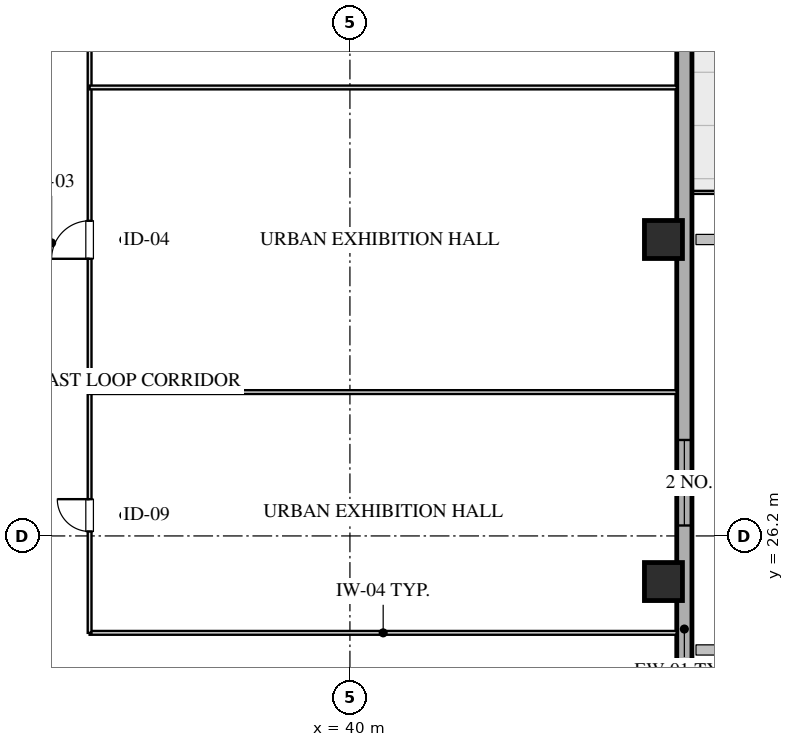
"""IFC4 building model, lengths in metres.
Left out: names, types, materials, properties, quantities, classifications, styles, units other than length and angle.
Written with IfcOpenShell. Run it as: python <this file> out.ifc"""

import sys

from ifc_helpers import new_model, si_unit, direction, frame, frame_2d, origin, origin_2d, place, context, subcontext, project, spatial, rectangle, hollow_rectangle, extrude, element, fill, save


model = new_model("IFC4")
c1 = context("Model", 3, precision=1e-05, world=origin(), true_north=direction((0.0, 1.0)))
c2 = subcontext(c1, "Body", "Model", "MODEL_VIEW")
j1 = project(units=[si_unit("LENGTHUNIT", "METRE"), si_unit("PLANEANGLEUNIT", "RADIAN")], contexts=[c1])
p1 = place(None, origin())
s1 = spatial("IfcSite", under=j1, at=p1, CompositionType="ELEMENT")
p2 = place(p1, origin())
s2 = spatial("IfcBuilding", under=s1, at=p2, CompositionType="ELEMENT")
p3 = place(p2, frame((0.0, 0.0, 142.6)))
s3 = spatial("IfcBuildingStorey", under=s2, at=p3, CompositionType="ELEMENT", Elevation=142.6)
for number, where, z_axis, x_axis in (
    (1, (48.25, 25.0, 0.0), (0.0, 0.0, 1.0), (1.0, 0.0, 0.0)),
    (2, (48.25, 34.0, 0.0), (0.0, 0.0, 1.0), (1.0, 0.0, 0.0)),
):
    element("IfcColumn", number, at=place(p3, frame(where, z_axis=z_axis, x_axis=x_axis)), inside=s3, PredefinedType="COLUMN", context=c2, shape_type="SweptSolid", body=[
        extrude(hollow_rectangle(XDim=1.0, YDim=1.0, WallThickness=0.036, at=origin_2d()), origin(), (0.0, 0.0, 1.0), 3.451),
    ])
p4 = place(p3, frame((48.8, 59.0, 0.0), z_axis=(0.0, 0.0, 1.0), x_axis=(0.0, -1.0, 0.0)))
e3 = element("IfcWall", 3, at=p4, inside=s3, PredefinedType="SOLIDWALL", context=c2, shape_type="SweptSolid", body=[
    extrude(rectangle(XDim=50.0, YDim=0.4, at=frame_2d((25.0, 0.0))), origin(), (0.0, 0.0, 1.0), 2.61),
])
p5 = place(p4, frame((30.275, 0.0, 0.75)))
e4 = element("IfcOpeningElement", 4, at=p5, cuts=e3, PredefinedType="OPENING", context=c2, shape_type="SweptSolid", body=[
    extrude(rectangle(XDim=2.25, YDim=1.46, at=frame_2d((1.125, 0.73))), frame((0.0, 0.21, 0.0), z_axis=(0.0, -1.0, 0.0), x_axis=(1.0, 0.0, 0.0)), (0.0, 0.0, 1.0), 0.42),
])
p6 = place(p4, frame((18.65, 0.0, 0.0)))
e5 = element("IfcOpeningElement", 5, at=p6, cuts=e3, PredefinedType="OPENING", context=c2, shape_type="SweptSolid", body=[
    extrude(rectangle(XDim=1.1, YDim=2.15, at=frame_2d((0.55, 1.075))), frame((0.0, 0.21, 0.0), z_axis=(0.0, -1.0, 0.0), x_axis=(1.0, 0.0, 0.0)), (0.0, 0.0, 1.0), 0.42),
])
p7 = place(p3, frame((33.15, 23.65, 0.0), z_axis=(0.0, 0.0, 1.0), x_axis=(1.0, 0.0, 0.0)))
e6 = element("IfcWall", 6, at=p7, inside=s3, PredefinedType="MOVABLE", context=c2, shape_type="SweptSolid", body=[
    extrude(rectangle(XDim=15.45, YDim=0.1, at=frame_2d((7.725, 0.0))), origin(), (0.0, 0.0, 1.0), 3.175),
])
p8 = place(p3, frame((33.15, 23.65, 0.0), z_axis=(0.0, 0.0, 1.0), x_axis=(0.0, 1.0, 0.0)))
e7 = element("IfcWall", 7, at=p8, inside=s3, PredefinedType="MOVABLE", context=c2, shape_type="SweptSolid", body=[
    extrude(rectangle(XDim=20.7, YDim=0.1, at=frame_2d((10.35, 0.0))), origin(), (0.0, 0.0, 1.0), 3.175),
])
p9 = place(p8, frame((2.667, 0.0, 0.0)))
e8 = element("IfcOpeningElement", 8, at=p9, cuts=e7, PredefinedType="OPENING", context=c2, shape_type="SweptSolid", body=[
    extrude(rectangle(XDim=0.85, YDim=2.05, at=frame_2d((0.425, 1.025))), frame((0.0, 0.06, 0.0), z_axis=(0.0, -1.0, 0.0), x_axis=(1.0, 0.0, 0.0)), (0.0, 0.0, 1.0), 0.12),
])
p10 = place(p8, frame((9.843, 0.0, 0.0)))
e9 = element("IfcOpeningElement", 9, at=p10, cuts=e7, PredefinedType="OPENING", context=c2, shape_type="SweptSolid", body=[
    extrude(rectangle(XDim=1.0, YDim=2.05, at=frame_2d((0.5, 1.025))), frame((0.0, 0.06, 0.0), z_axis=(0.0, -1.0, 0.0), x_axis=(1.0, 0.0, 0.0)), (0.0, 0.0, 1.0), 0.12),
])
p11 = place(p8, frame((17.025, 0.0, 0.0)))
e10 = element("IfcOpeningElement", 10, at=p11, cuts=e7, PredefinedType="OPENING", context=c2, shape_type="SweptSolid", body=[
    extrude(rectangle(XDim=1.0, YDim=2.05, at=frame_2d((0.5, 1.025))), frame((0.0, 0.06, 0.0), z_axis=(0.0, -1.0, 0.0), x_axis=(1.0, 0.0, 0.0)), (0.0, 0.0, 1.0), 0.12),
])
for number, where, z_axis, x_axis in (
    (11, (33.15, 29.985, 0.0), (0.0, 0.0, 1.0), (1.0, 0.0, 0.0)),
    (12, (33.15, 38.0, 0.0), (0.0, 0.0, 1.0), (1.0, 0.0, 0.0)),
):
    element("IfcWall", number, at=place(p3, frame(where, z_axis=z_axis, x_axis=x_axis)), inside=s3, PredefinedType="MOVABLE", context=c2, shape_type="SweptSolid", body=[
        extrude(rectangle(XDim=15.45, YDim=0.1, at=frame_2d((7.725, 0.0))), origin(), (0.0, 0.0, 1.0), 3.175),
    ])
p12 = place(p5, origin())
e13 = element("IfcWindow", 13, at=p12, inside=s3, PartitioningType="TRIPLE_PANEL_VERTICAL", PredefinedType="WINDOW", context=c2, shape_type="SweptSolid", body=[
    extrude(rectangle(XDim=2.25, YDim=1.46, at=frame_2d((1.125, 0.73))), frame((0.0, 0.03, 0.0), z_axis=(0.0, -1.0, 0.0), x_axis=(1.0, 0.0, 0.0)), (0.0, 0.0, 1.0), 0.06),
])
fill(e4, e13)
p13 = place(p9, origin())
e14 = element("IfcDoor", 14, at=p13, inside=s3, OperationType="SINGLE_SWING_RIGHT", PredefinedType="DOOR", context=c2, shape_type="SweptSolid", body=[
    extrude(rectangle(XDim=0.85, YDim=2.05, at=frame_2d((0.425, 1.025))), frame((0.0, 0.025, 0.0), z_axis=(0.0, -1.0, 0.0), x_axis=(1.0, 0.0, 0.0)), (0.0, 0.0, 1.0), 0.05),
])
fill(e8, e14)
p14 = place(p10, origin())
e15 = element("IfcDoor", 15, at=p14, inside=s3, OperationType="SINGLE_SWING_LEFT", PredefinedType="DOOR", context=c2, shape_type="SweptSolid", body=[
    extrude(rectangle(XDim=1.0, YDim=2.05, at=frame_2d((0.5, 1.025))), frame((0.0, 0.025, 0.0), z_axis=(0.0, -1.0, 0.0), x_axis=(1.0, 0.0, 0.0)), (0.0, 0.0, 1.0), 0.05),
])
fill(e9, e15)
save(model, sys.argv[1])
